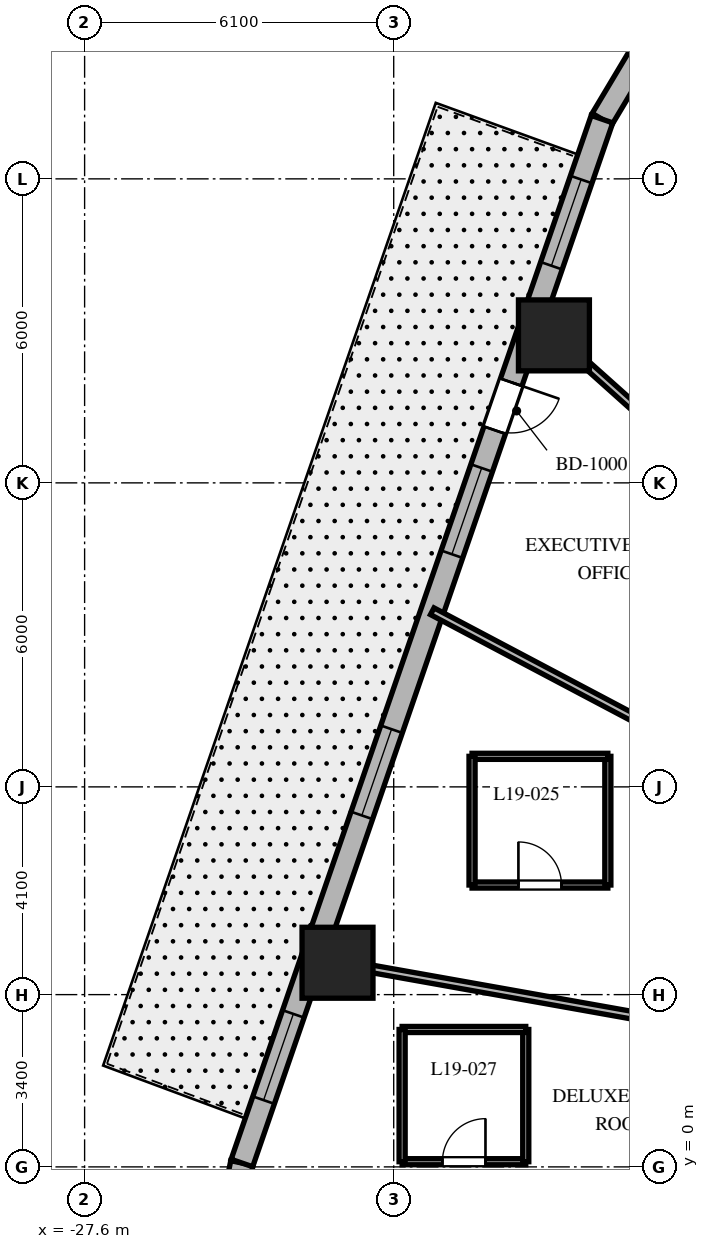
"""IFC4 building model, lengths in metres.
Left out: names, types, materials, properties, quantities, classifications, styles, units other than length and angle.
Written with IfcOpenShell. Run it as: python <this file> out.ifc"""

import sys

from ifc_helpers import new_model, si_unit, direction, frame, frame_2d, origin, origin_2d, place, context, subcontext, project, spatial, rectangle, extrude, element, fill, save


model = new_model("IFC4")
c1 = context("Model", 3, precision=1e-05, world=origin(), true_north=direction((0.0, 1.0)))
c2 = subcontext(c1, "Body", "Model", "MODEL_VIEW")
j1 = project(units=[si_unit("LENGTHUNIT", "METRE"), si_unit("PLANEANGLEUNIT", "RADIAN")], contexts=[c1])
p1 = place(None, origin())
s1 = spatial("IfcSite", under=j1, at=p1, CompositionType="ELEMENT")
p2 = place(p1, origin())
s2 = spatial("IfcBuilding", under=s1, at=p2, CompositionType="ELEMENT")
p3 = place(p2, frame((0.0, 0.0, 82.3)))
s3 = spatial("IfcBuildingStorey", under=s2, at=p3, CompositionType="ELEMENT", Elevation=82.3)
for number, where, z_axis, x_axis in (
    (1, (-18.338, 16.411, 0.0), (0.0, 0.0, 1.0), (1.0, 0.0, 0.0)),
    (2, (-22.609, 4.029, 0.0), (0.0, 0.0, 1.0), (1.0, 0.0, 0.0)),
):
    element("IfcColumn", number, at=place(p3, frame(where, z_axis=z_axis, x_axis=x_axis)), inside=s3, PredefinedType="COLUMN", context=c2, shape_type="SweptSolid", body=[
        extrude(rectangle(XDim=1.4, YDim=1.4, at=origin_2d()), origin(), (0.0, 0.0, 1.0), 3.7),
    ])
p4 = place(p3, frame((-16.669, 21.885, 0.0), z_axis=(0.0, 0.0, 1.0), x_axis=(-0.512936712947, -0.858426425799, 0.0)))
e3 = element("IfcWall", 3, at=p4, inside=s3, PredefinedType="SOLIDWALL", context=c2, shape_type="SweptSolid", body=[
    extrude(rectangle(XDim=1.406, YDim=0.45, at=frame_2d((0.703, 0.0))), origin(), (0.0, 0.0, 1.0), 3.38),
])
p5 = place(p3, frame((-24.496, 0.077, 0.0), z_axis=(0.0, 0.0, 1.0), x_axis=(-0.199570594521, -0.979883451132, 0.0)))
e4 = element("IfcWall", 4, at=p5, inside=s3, PredefinedType="SOLIDWALL", context=c2, shape_type="SweptSolid", body=[
    extrude(rectangle(XDim=0.897, YDim=0.45, at=frame_2d((0.448, 0.0))), origin(), (0.0, 0.0, 1.0), 3.38),
])
p6 = place(p3, frame((-17.39, 20.678, 0.0), z_axis=(0.0, 0.0, 1.0), x_axis=(-0.326068018294, -0.945346310854, 0.0)))
e5 = element("IfcWall", 5, at=p6, inside=s3, PredefinedType="SOLIDWALL", context=c2, shape_type="SweptSolid", body=[
    extrude(rectangle(XDim=21.793, YDim=0.45, at=frame_2d((10.896, 0.0))), origin(), (0.0, 0.0, 1.0), 3.38),
])
p7 = place(p6, frame((5.493, 0.0, 0.0)))
e6 = element("IfcOpeningElement", 6, at=p7, cuts=e5, PredefinedType="OPENING", context=c2, shape_type="SweptSolid", body=[
    extrude(rectangle(XDim=1.0, YDim=2.15, at=frame_2d((0.5, 1.075))), frame((0.0, 0.235, 0.0), z_axis=(0.0, -1.0, 0.0), x_axis=(1.0, 0.0, 0.0)), (0.0, 0.0, 1.0), 0.47),
])
p8 = place(p6, frame((1.26, 0.0, 0.8)))
e7 = element("IfcOpeningElement", 7, at=p8, cuts=e5, PredefinedType="OPENING", context=c2, shape_type="SweptSolid", body=[
    extrude(rectangle(XDim=1.8, YDim=1.8, at=frame_2d((0.9, 0.9))), frame((0.0, 0.235, 0.0), z_axis=(0.0, -1.0, 0.0), x_axis=(1.0, 0.0, 0.0)), (0.0, 0.0, 1.0), 0.47),
])
p9 = place(p6, frame((7.283, 0.0, 0.8)))
e8 = element("IfcOpeningElement", 8, at=p9, cuts=e5, PredefinedType="OPENING", context=c2, shape_type="SweptSolid", body=[
    extrude(rectangle(XDim=1.8, YDim=1.8, at=frame_2d((0.9, 0.9))), frame((0.0, 0.235, 0.0), z_axis=(0.0, -1.0, 0.0), x_axis=(1.0, 0.0, 0.0)), (0.0, 0.0, 1.0), 0.47),
])
p10 = place(p6, frame((12.736, 0.0, 0.8)))
e9 = element("IfcOpeningElement", 9, at=p10, cuts=e5, PredefinedType="OPENING", context=c2, shape_type="SweptSolid", body=[
    extrude(rectangle(XDim=1.8, YDim=1.8, at=frame_2d((0.9, 0.9))), frame((0.0, 0.235, 0.0), z_axis=(0.0, -1.0, 0.0), x_axis=(1.0, 0.0, 0.0)), (0.0, 0.0, 1.0), 0.47),
])
p11 = place(p6, frame((18.68, 0.0, 0.8)))
e10 = element("IfcOpeningElement", 10, at=p11, cuts=e5, PredefinedType="OPENING", context=c2, shape_type="SweptSolid", body=[
    extrude(rectangle(XDim=1.8, YDim=1.8, at=frame_2d((0.9, 0.9))), frame((0.0, 0.235, 0.0), z_axis=(0.0, -1.0, 0.0), x_axis=(1.0, 0.0, 0.0)), (0.0, 0.0, 1.0), 0.47),
])
p12 = place(p3, frame((-11.007, 9.85, 0.0), z_axis=(0.0, 0.0, 1.0), x_axis=(-0.745177305978, 0.666866390407, 0.0)))
e11 = element("IfcWall", 11, at=p12, inside=s3, PredefinedType="PARTITIONING", context=c2, shape_type="SweptSolid", body=[
    extrude(rectangle(XDim=10.375, YDim=0.15, at=frame_2d((5.188, 0.0))), origin(), (0.0, 0.0, 1.0), 2.52),
])
p13 = place(p3, frame((-11.35, 6.001, 0.0), z_axis=(0.0, 0.0, 1.0), x_axis=(-0.884022077319, 0.467445148453, 0.0)))
e12 = element("IfcWall", 12, at=p13, inside=s3, PredefinedType="PARTITIONING", context=c2, shape_type="SweptSolid", body=[
    extrude(rectangle(XDim=10.621, YDim=0.15, at=frame_2d((5.311, 0.0))), origin(), (0.0, 0.0, 1.0), 2.52),
])
p14 = place(p3, frame((-11.35, 2.023, 0.0), z_axis=(0.0, 0.0, 1.0), x_axis=(-0.984493741877, 0.17541970301, 0.0)))
e13 = element("IfcWall", 13, at=p14, inside=s3, PredefinedType="PARTITIONING", context=c2, shape_type="SweptSolid", body=[
    extrude(rectangle(XDim=11.937, YDim=0.15, at=frame_2d((5.969, 0.0))), origin(), (0.0, 0.0, 1.0), 2.52),
])
p15 = place(p3, frame((-19.954, 5.563, 0.0), z_axis=(0.0, 0.0, 1.0), x_axis=(1.0, 0.0, 0.0)))
e14 = element("IfcWall", 14, at=p15, inside=s3, PredefinedType="PARTITIONING", context=c2, shape_type="SweptSolid", body=[
    extrude(rectangle(XDim=2.68, YDim=0.12, at=frame_2d((1.34, 0.0))), origin(), (0.0, 0.0, 1.0), 2.82),
])
p16 = place(p15, frame((0.915, 0.0, 0.0)))
e15 = element("IfcOpeningElement", 15, at=p16, cuts=e14, PredefinedType="OPENING", context=c2, shape_type="SweptSolid", body=[
    extrude(rectangle(XDim=0.85, YDim=2.03, at=frame_2d((0.425, 1.015))), frame((0.0, 0.07, 0.0), z_axis=(0.0, -1.0, 0.0), x_axis=(1.0, 0.0, 0.0)), (0.0, 0.0, 1.0), 0.14),
])
p17 = place(p3, frame((-17.274, 5.563, 0.0), z_axis=(0.0, 0.0, 1.0), x_axis=(0.0, 1.0, 0.0)))
e16 = element("IfcWall", 16, at=p17, inside=s3, PredefinedType="PARTITIONING", context=c2, shape_type="SweptSolid", body=[
    extrude(rectangle(XDim=2.54, YDim=0.12, at=frame_2d((1.27, 0.0))), origin(), (0.0, 0.0, 1.0), 2.952),
])
p18 = place(p3, frame((-17.274, 8.103, 0.0), z_axis=(0.0, 0.0, 1.0), x_axis=(-1.0, 0.0, 0.0)))
e17 = element("IfcWall", 17, at=p18, inside=s3, PredefinedType="PARTITIONING", context=c2, shape_type="SweptSolid", body=[
    extrude(rectangle(XDim=2.68, YDim=0.12, at=frame_2d((1.34, 0.0))), origin(), (0.0, 0.0, 1.0), 3.38),
])
p19 = place(p3, frame((-19.954, 8.103, 0.0), z_axis=(0.0, 0.0, 1.0), x_axis=(0.0, -1.0, 0.0)))
e18 = element("IfcWall", 18, at=p19, inside=s3, PredefinedType="PARTITIONING", context=c2, shape_type="SweptSolid", body=[
    extrude(rectangle(XDim=2.54, YDim=0.12, at=frame_2d((1.27, 0.0))), origin(), (0.0, 0.0, 1.0), 3.38),
])
p20 = place(p3, frame((-21.334, 0.102, 0.0), z_axis=(0.0, 0.0, 1.0), x_axis=(1.0, 0.0, 0.0)))
e19 = element("IfcWall", 19, at=p20, inside=s3, PredefinedType="PARTITIONING", context=c2, shape_type="SweptSolid", body=[
    extrude(rectangle(XDim=2.44, YDim=0.12, at=frame_2d((1.22, 0.0))), origin(), (0.0, 0.0, 1.0), 3.38),
])
p21 = place(p20, frame((0.795, 0.0, 0.0)))
e20 = element("IfcOpeningElement", 20, at=p21, cuts=e19, PredefinedType="OPENING", context=c2, shape_type="SweptSolid", body=[
    extrude(rectangle(XDim=0.85, YDim=2.03, at=frame_2d((0.425, 1.015))), frame((0.0, 0.07, 0.0), z_axis=(0.0, -1.0, 0.0), x_axis=(1.0, 0.0, 0.0)), (0.0, 0.0, 1.0), 0.14),
])
p22 = place(p3, frame((-18.894, 0.102, 0.0), z_axis=(0.0, 0.0, 1.0), x_axis=(0.0, 1.0, 0.0)))
e21 = element("IfcWall", 21, at=p22, inside=s3, PredefinedType="PARTITIONING", context=c2, shape_type="SweptSolid", body=[
    extrude(rectangle(XDim=2.61, YDim=0.12, at=frame_2d((1.305, 0.0))), origin(), (0.0, 0.0, 1.0), 3.38),
])
p23 = place(p3, frame((-18.894, 2.712, 0.0), z_axis=(0.0, 0.0, 1.0), x_axis=(-1.0, 0.0, 0.0)))
e22 = element("IfcWall", 22, at=p23, inside=s3, PredefinedType="PARTITIONING", context=c2, shape_type="SweptSolid", body=[
    extrude(rectangle(XDim=2.44, YDim=0.12, at=frame_2d((1.22, 0.0))), origin(), (0.0, 0.0, 1.0), 3.38),
])
p24 = place(p3, frame((-21.334, 2.712, 0.0), z_axis=(0.0, 0.0, 1.0), x_axis=(0.0, -1.0, 0.0)))
e23 = element("IfcWall", 23, at=p24, inside=s3, PredefinedType="PARTITIONING", context=c2, shape_type="SweptSolid", body=[
    extrude(rectangle(XDim=2.61, YDim=0.12, at=frame_2d((1.305, 0.0))), origin(), (0.0, 0.0, 1.0), 3.38),
])
p25 = place(p7, origin())
e24 = element("IfcDoor", 24, at=p25, inside=s3, OperationType="SINGLE_SWING_LEFT", PredefinedType="DOOR", context=c2, shape_type="SweptSolid", body=[
    extrude(rectangle(XDim=1.0, YDim=2.15, at=frame_2d((0.5, 1.075))), frame((0.0, 0.025, 0.0), z_axis=(0.0, -1.0, 0.0), x_axis=(1.0, 0.0, 0.0)), (0.0, 0.0, 1.0), 0.05),
])
fill(e6, e24)
p26 = place(p8, origin())
e25 = element("IfcWindow", 25, at=p26, inside=s3, PartitioningType="SINGLE_PANEL", PredefinedType="WINDOW", context=c2, shape_type="SweptSolid", body=[
    extrude(rectangle(XDim=1.8, YDim=1.8, at=frame_2d((0.9, 0.9))), frame((0.0, 0.03, 0.0), z_axis=(0.0, -1.0, 0.0), x_axis=(1.0, 0.0, 0.0)), (0.0, 0.0, 1.0), 0.06),
])
fill(e7, e25)
p27 = place(p9, origin())
e26 = element("IfcWindow", 26, at=p27, inside=s3, PartitioningType="SINGLE_PANEL", PredefinedType="WINDOW", context=c2, shape_type="SweptSolid", body=[
    extrude(rectangle(XDim=1.8, YDim=1.8, at=frame_2d((0.9, 0.9))), frame((0.0, 0.03, 0.0), z_axis=(0.0, -1.0, 0.0), x_axis=(1.0, 0.0, 0.0)), (0.0, 0.0, 1.0), 0.06),
])
fill(e8, e26)
p28 = place(p10, origin())
e27 = element("IfcWindow", 27, at=p28, inside=s3, PartitioningType="SINGLE_PANEL", PredefinedType="WINDOW", context=c2, shape_type="SweptSolid", body=[
    extrude(rectangle(XDim=1.8, YDim=1.8, at=frame_2d((0.9, 0.9))), frame((0.0, 0.03, 0.0), z_axis=(0.0, -1.0, 0.0), x_axis=(1.0, 0.0, 0.0)), (0.0, 0.0, 1.0), 0.06),
])
fill(e9, e27)
p29 = place(p11, origin())
e28 = element("IfcWindow", 28, at=p29, inside=s3, PartitioningType="SINGLE_PANEL", PredefinedType="WINDOW", context=c2, shape_type="SweptSolid", body=[
    extrude(rectangle(XDim=1.8, YDim=1.8, at=frame_2d((0.9, 0.9))), frame((0.0, 0.03, 0.0), z_axis=(0.0, -1.0, 0.0), x_axis=(1.0, 0.0, 0.0)), (0.0, 0.0, 1.0), 0.06),
])
fill(e10, e28)
p30 = place(p16, origin())
e29 = element("IfcDoor", 29, at=p30, inside=s3, OperationType="SINGLE_SWING_LEFT", PredefinedType="DOOR", context=c2, shape_type="SweptSolid", body=[
    extrude(rectangle(XDim=0.85, YDim=2.03, at=frame_2d((0.425, 1.015))), frame((0.0, 0.025, 0.0), z_axis=(0.0, -1.0, 0.0), x_axis=(1.0, 0.0, 0.0)), (0.0, 0.0, 1.0), 0.05),
])
fill(e15, e29)
p31 = place(p21, origin())
e30 = element("IfcDoor", 30, at=p31, inside=s3, OperationType="SINGLE_SWING_RIGHT", PredefinedType="DOOR", context=c2, shape_type="SweptSolid", body=[
    extrude(rectangle(XDim=0.85, YDim=2.03, at=frame_2d((0.425, 1.015))), frame((0.0, 0.025, 0.0), z_axis=(0.0, -1.0, 0.0), x_axis=(1.0, 0.0, 0.0)), (0.0, 0.0, 1.0), 0.05),
])
fill(e20, e30)
save(model, sys.argv[1])
